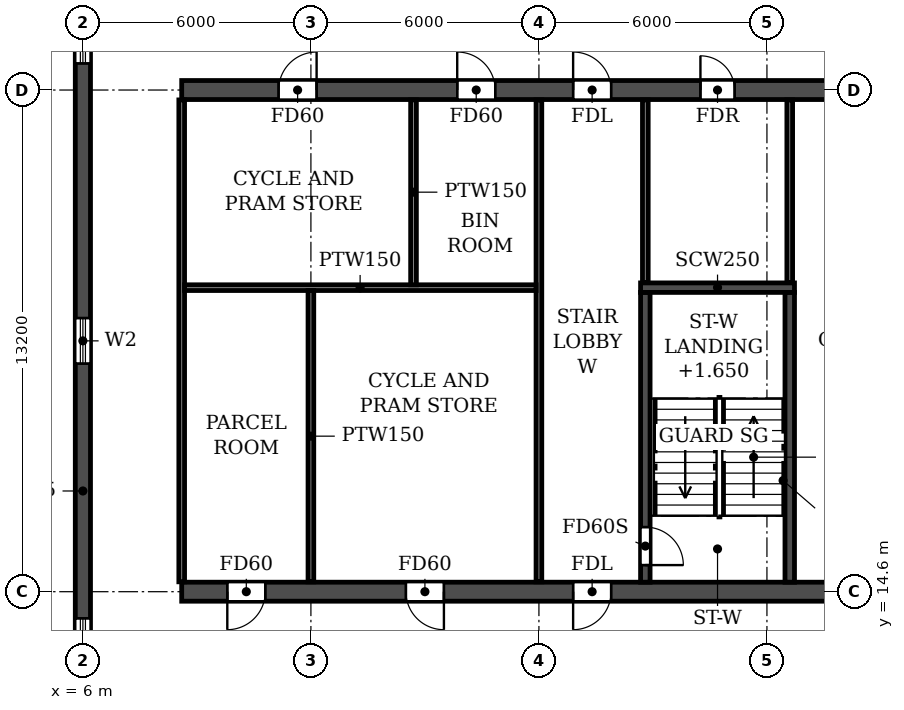
"""IFC4 building model, lengths in metres.
Left out: names, types, materials, properties, quantities, classifications, styles, units other than length and angle.
Written with IfcOpenShell. Run it as: python <this file> out.ifc"""

import sys

from ifc_helpers import new_model, si_unit, direction, frame, frame_2d, origin, place, context, subcontext, project, spatial, rectangle, extrude, element, fill, save


model = new_model("IFC4")
c1 = context("Model", 3, precision=1e-05, world=origin(), true_north=direction((0.0, 1.0)))
c2 = subcontext(c1, "Body", "Model", "MODEL_VIEW")
j1 = project(units=[si_unit("LENGTHUNIT", "METRE"), si_unit("PLANEANGLEUNIT", "RADIAN")], contexts=[c1])
p1 = place(None, origin())
s1 = spatial("IfcSite", under=j1, at=p1, CompositionType="ELEMENT")
p2 = place(p1, origin())
s2 = spatial("IfcBuilding", under=s1, at=p2, CompositionType="ELEMENT")
p3 = place(p2, frame((0.0, 0.0, 82.8)))
s3 = spatial("IfcBuildingStorey", under=s2, at=p3, CompositionType="ELEMENT", Elevation=82.8)
p4 = place(p3, frame((6.0, 4.683, 0.0), z_axis=(0.0, 0.0, 1.0), x_axis=(0.0, 1.0, 0.0)))
e1 = element("IfcWall", 1, at=p4, inside=s3, PredefinedType="SHEAR", context=c2, shape_type="SweptSolid", body=[
    extrude(rectangle(XDim=34.234, YDim=0.4, at=frame_2d((17.117, 0.0))), origin(), (0.0, 0.0, 1.0), 3.06),
])
p5 = place(p4, frame((23.817, 0.0, 0.9)))
e2 = element("IfcOpeningElement", 2, at=p5, cuts=e1, PredefinedType="OPENING", context=c2, shape_type="SweptSolid", body=[
    extrude(rectangle(XDim=1.2, YDim=1.5, at=frame_2d((0.6, 0.75))), frame((0.0, 0.21, 0.0), z_axis=(0.0, -1.0, 0.0), x_axis=(1.0, 0.0, 0.0)), (0.0, 0.0, 1.0), 0.42),
])
p6 = place(p4, frame((8.017, 0.0, 0.9)))
e3 = element("IfcOpeningElement", 3, at=p6, cuts=e1, PredefinedType="OPENING", context=c2, shape_type="SweptSolid", body=[
    extrude(rectangle(XDim=1.2, YDim=1.5, at=frame_2d((0.6, 0.75))), frame((0.0, 0.21, 0.0), z_axis=(0.0, -1.0, 0.0), x_axis=(1.0, 0.0, 0.0)), (0.0, 0.0, 1.0), 0.42),
])
p7 = place(p4, frame((15.917, 0.0, 0.9)))
e4 = element("IfcOpeningElement", 4, at=p7, cuts=e1, PredefinedType="OPENING", context=c2, shape_type="SweptSolid", body=[
    extrude(rectangle(XDim=1.2, YDim=1.5, at=frame_2d((0.6, 0.75))), frame((0.0, 0.21, 0.0), z_axis=(0.0, -1.0, 0.0), x_axis=(1.0, 0.0, 0.0)), (0.0, 0.0, 1.0), 0.42),
])
p8 = place(p4, frame((28.894, 0.0, 0.6)))
e5 = element("IfcOpeningElement", 5, at=p8, cuts=e1, PredefinedType="OPENING", context=c2, shape_type="SweptSolid", body=[
    extrude(rectangle(XDim=2.2, YDim=1.8, at=frame_2d((1.1, 0.9))), frame((0.0, 0.21, 0.0), z_axis=(0.0, -1.0, 0.0), x_axis=(1.0, 0.0, 0.0)), (0.0, 0.0, 1.0), 0.42),
])
p9 = place(p4, frame((2.541, 0.0, 0.6)))
e6 = element("IfcOpeningElement", 6, at=p9, cuts=e1, PredefinedType="OPENING", context=c2, shape_type="SweptSolid", body=[
    extrude(rectangle(XDim=2.2, YDim=1.8, at=frame_2d((1.1, 0.9))), frame((0.0, 0.21, 0.0), z_axis=(0.0, -1.0, 0.0), x_axis=(1.0, 0.0, 0.0)), (0.0, 0.0, 1.0), 0.42),
])
p10 = place(p3, frame((8.6, 14.6, 0.0), z_axis=(0.0, 0.0, 1.0), x_axis=(1.0, 0.0, 0.0)))
e7 = element("IfcWall", 7, at=p10, inside=s3, PredefinedType="SOLIDWALL", context=c2, shape_type="SweptSolid", body=[
    extrude(rectangle(XDim=84.8, YDim=0.5, at=frame_2d((42.4, 0.0))), origin(), (0.0, 0.0, 1.0), 3.06),
])
p11 = place(p10, frame((1.2, 0.0, 0.0)))
e8 = element("IfcOpeningElement", 8, at=p11, cuts=e7, PredefinedType="OPENING", context=c2, shape_type="SweptSolid", body=[
    extrude(rectangle(XDim=1.0, YDim=2.1, at=frame_2d((0.5, 1.05))), frame((0.0, 0.26, 0.0), z_axis=(0.0, -1.0, 0.0), x_axis=(1.0, 0.0, 0.0)), (0.0, 0.0, 1.0), 0.52),
])
p12 = place(p10, frame((5.9, 0.0, 0.0)))
e9 = element("IfcOpeningElement", 9, at=p12, cuts=e7, PredefinedType="OPENING", context=c2, shape_type="SweptSolid", body=[
    extrude(rectangle(XDim=1.0, YDim=2.1, at=frame_2d((0.5, 1.05))), frame((0.0, 0.26, 0.0), z_axis=(0.0, -1.0, 0.0), x_axis=(1.0, 0.0, 0.0)), (0.0, 0.0, 1.0), 0.52),
])
p13 = place(p10, frame((10.3, 0.0, 0.0)))
e10 = element("IfcOpeningElement", 10, at=p13, cuts=e7, PredefinedType="OPENING", context=c2, shape_type="SweptSolid", body=[
    extrude(rectangle(XDim=1.0, YDim=2.1, at=frame_2d((0.5, 1.05))), frame((0.0, 0.26, 0.0), z_axis=(0.0, -1.0, 0.0), x_axis=(1.0, 0.0, 0.0)), (0.0, 0.0, 1.0), 0.52),
])
p14 = place(p10, frame((18.2, 0.0, 0.0)))
e11 = element("IfcOpeningElement", 11, at=p14, cuts=e7, PredefinedType="OPENING", context=c2, shape_type="SweptSolid", body=[
    extrude(rectangle(XDim=1.0, YDim=2.1, at=frame_2d((0.5, 1.05))), frame((0.0, 0.26, 0.0), z_axis=(0.0, -1.0, 0.0), x_axis=(1.0, 0.0, 0.0)), (0.0, 0.0, 1.0), 0.52),
])
p15 = place(p10, frame((22.8, 0.0, 0.0)))
e12 = element("IfcOpeningElement", 12, at=p15, cuts=e7, PredefinedType="OPENING", context=c2, shape_type="SweptSolid", body=[
    extrude(rectangle(XDim=1.0, YDim=2.1, at=frame_2d((0.5, 1.05))), frame((0.0, 0.26, 0.0), z_axis=(0.0, -1.0, 0.0), x_axis=(1.0, 0.0, 0.0)), (0.0, 0.0, 1.0), 0.52),
])
p16 = place(p10, frame((36.7, 0.0, 0.0)))
e13 = element("IfcOpeningElement", 13, at=p16, cuts=e7, PredefinedType="OPENING", context=c2, shape_type="SweptSolid", body=[
    extrude(rectangle(XDim=1.0, YDim=2.1, at=frame_2d((0.5, 1.05))), frame((0.0, 0.26, 0.0), z_axis=(0.0, -1.0, 0.0), x_axis=(1.0, 0.0, 0.0)), (0.0, 0.0, 1.0), 0.52),
])
p17 = place(p10, frame((41.9, 0.0, 0.0)))
e14 = element("IfcOpeningElement", 14, at=p17, cuts=e7, PredefinedType="OPENING", context=c2, shape_type="SweptSolid", body=[
    extrude(rectangle(XDim=1.0, YDim=2.1, at=frame_2d((0.5, 1.05))), frame((0.0, 0.26, 0.0), z_axis=(0.0, -1.0, 0.0), x_axis=(1.0, 0.0, 0.0)), (0.0, 0.0, 1.0), 0.52),
])
p18 = place(p10, frame((44.5, 0.0, 0.0)))
e15 = element("IfcOpeningElement", 15, at=p18, cuts=e7, PredefinedType="OPENING", context=c2, shape_type="SweptSolid", body=[
    extrude(rectangle(XDim=1.0, YDim=2.1, at=frame_2d((0.5, 1.05))), frame((0.0, 0.26, 0.0), z_axis=(0.0, -1.0, 0.0), x_axis=(1.0, 0.0, 0.0)), (0.0, 0.0, 1.0), 0.52),
])
p19 = place(p10, frame((48.4, 0.0, 0.0)))
e16 = element("IfcOpeningElement", 16, at=p19, cuts=e7, PredefinedType="OPENING", context=c2, shape_type="SweptSolid", body=[
    extrude(rectangle(XDim=1.0, YDim=2.1, at=frame_2d((0.5, 1.05))), frame((0.0, 0.26, 0.0), z_axis=(0.0, -1.0, 0.0), x_axis=(1.0, 0.0, 0.0)), (0.0, 0.0, 1.0), 0.52),
])
p20 = place(p10, frame((61.0, 0.0, 0.0)))
e17 = element("IfcOpeningElement", 17, at=p20, cuts=e7, PredefinedType="OPENING", context=c2, shape_type="SweptSolid", body=[
    extrude(rectangle(XDim=1.0, YDim=2.1, at=frame_2d((0.5, 1.05))), frame((0.0, 0.26, 0.0), z_axis=(0.0, -1.0, 0.0), x_axis=(1.0, 0.0, 0.0)), (0.0, 0.0, 1.0), 0.52),
])
p21 = place(p10, frame((65.6, 0.0, 0.0)))
e18 = element("IfcOpeningElement", 18, at=p21, cuts=e7, PredefinedType="OPENING", context=c2, shape_type="SweptSolid", body=[
    extrude(rectangle(XDim=1.0, YDim=2.1, at=frame_2d((0.5, 1.05))), frame((0.0, 0.26, 0.0), z_axis=(0.0, -1.0, 0.0), x_axis=(1.0, 0.0, 0.0)), (0.0, 0.0, 1.0), 0.52),
])
p22 = place(p10, frame((73.5, 0.0, 0.0)))
e19 = element("IfcOpeningElement", 19, at=p22, cuts=e7, PredefinedType="OPENING", context=c2, shape_type="SweptSolid", body=[
    extrude(rectangle(XDim=1.0, YDim=2.1, at=frame_2d((0.5, 1.05))), frame((0.0, 0.26, 0.0), z_axis=(0.0, -1.0, 0.0), x_axis=(1.0, 0.0, 0.0)), (0.0, 0.0, 1.0), 0.52),
])
p23 = place(p10, frame((77.3, 0.0, 0.0)))
e20 = element("IfcOpeningElement", 20, at=p23, cuts=e7, PredefinedType="OPENING", context=c2, shape_type="SweptSolid", body=[
    extrude(rectangle(XDim=1.0, YDim=2.1, at=frame_2d((0.5, 1.05))), frame((0.0, 0.26, 0.0), z_axis=(0.0, -1.0, 0.0), x_axis=(1.0, 0.0, 0.0)), (0.0, 0.0, 1.0), 0.52),
])
p24 = place(p10, frame((82.0, 0.0, 0.0)))
e21 = element("IfcOpeningElement", 21, at=p24, cuts=e7, PredefinedType="OPENING", context=c2, shape_type="SweptSolid", body=[
    extrude(rectangle(XDim=1.0, YDim=2.1, at=frame_2d((0.5, 1.05))), frame((0.0, 0.26, 0.0), z_axis=(0.0, -1.0, 0.0), x_axis=(1.0, 0.0, 0.0)), (0.0, 0.0, 1.0), 0.52),
])
p25 = place(p3, frame((8.6, 27.8, 0.0), z_axis=(0.0, 0.0, 1.0), x_axis=(1.0, 0.0, 0.0)))
e22 = element("IfcWall", 22, at=p25, inside=s3, PredefinedType="SOLIDWALL", context=c2, shape_type="SweptSolid", body=[
    extrude(rectangle(XDim=84.8, YDim=0.5, at=frame_2d((42.4, 0.0))), origin(), (0.0, 0.0, 1.0), 3.06),
])
p26 = place(p25, frame((2.55, 0.0, 0.0)))
e23 = element("IfcOpeningElement", 23, at=p26, cuts=e22, PredefinedType="OPENING", context=c2, shape_type="SweptSolid", body=[
    extrude(rectangle(XDim=1.0, YDim=2.1, at=frame_2d((0.5, 1.05))), frame((0.0, 0.26, 0.0), z_axis=(0.0, -1.0, 0.0), x_axis=(1.0, 0.0, 0.0)), (0.0, 0.0, 1.0), 0.52),
])
p27 = place(p25, frame((7.25, 0.0, 0.0)))
e24 = element("IfcOpeningElement", 24, at=p27, cuts=e22, PredefinedType="OPENING", context=c2, shape_type="SweptSolid", body=[
    extrude(rectangle(XDim=1.0, YDim=2.1, at=frame_2d((0.5, 1.05))), frame((0.0, 0.26, 0.0), z_axis=(0.0, -1.0, 0.0), x_axis=(1.0, 0.0, 0.0)), (0.0, 0.0, 1.0), 0.52),
])
p28 = place(p25, frame((10.3, 0.0, 0.0)))
e25 = element("IfcOpeningElement", 25, at=p28, cuts=e22, PredefinedType="OPENING", context=c2, shape_type="SweptSolid", body=[
    extrude(rectangle(XDim=1.0, YDim=2.1, at=frame_2d((0.5, 1.05))), frame((0.0, 0.26, 0.0), z_axis=(0.0, -1.0, 0.0), x_axis=(1.0, 0.0, 0.0)), (0.0, 0.0, 1.0), 0.52),
])
p29 = place(p25, frame((13.65, 0.0, 0.0)))
e26 = element("IfcOpeningElement", 26, at=p29, cuts=e22, PredefinedType="OPENING", context=c2, shape_type="SweptSolid", body=[
    extrude(rectangle(XDim=0.9, YDim=2.1, at=frame_2d((0.45, 1.05))), frame((0.0, 0.26, 0.0), z_axis=(0.0, -1.0, 0.0), x_axis=(1.0, 0.0, 0.0)), (0.0, 0.0, 1.0), 0.52),
])
p30 = place(p25, frame((22.85, 0.0, 0.0)))
e27 = element("IfcOpeningElement", 27, at=p30, cuts=e22, PredefinedType="OPENING", context=c2, shape_type="SweptSolid", body=[
    extrude(rectangle(XDim=0.9, YDim=2.1, at=frame_2d((0.45, 1.05))), frame((0.0, 0.26, 0.0), z_axis=(0.0, -1.0, 0.0), x_axis=(1.0, 0.0, 0.0)), (0.0, 0.0, 1.0), 0.52),
])
p31 = place(p25, frame((27.3, 0.0, 0.0)))
e28 = element("IfcOpeningElement", 28, at=p31, cuts=e22, PredefinedType="OPENING", context=c2, shape_type="SweptSolid", body=[
    extrude(rectangle(XDim=1.0, YDim=2.1, at=frame_2d((0.5, 1.05))), frame((0.0, 0.26, 0.0), z_axis=(0.0, -1.0, 0.0), x_axis=(1.0, 0.0, 0.0)), (0.0, 0.0, 1.0), 0.52),
])
p32 = place(p25, frame((32.25, 0.0, 0.0)))
e29 = element("IfcOpeningElement", 29, at=p32, cuts=e22, PredefinedType="OPENING", context=c2, shape_type="SweptSolid", body=[
    extrude(rectangle(XDim=1.5, YDim=2.1, at=frame_2d((0.75, 1.05))), frame((0.0, 0.26, 0.0), z_axis=(0.0, -1.0, 0.0), x_axis=(1.0, 0.0, 0.0)), (0.0, 0.0, 1.0), 0.52),
])
p33 = place(p25, frame((39.0, 0.0, 0.0)))
e30 = element("IfcOpeningElement", 30, at=p33, cuts=e22, PredefinedType="OPENING", context=c2, shape_type="SweptSolid", body=[
    extrude(rectangle(XDim=1.0, YDim=2.1, at=frame_2d((0.5, 1.05))), frame((0.0, 0.26, 0.0), z_axis=(0.0, -1.0, 0.0), x_axis=(1.0, 0.0, 0.0)), (0.0, 0.0, 1.0), 0.52),
])
p34 = place(p25, frame((41.9, 0.0, 0.0)))
e31 = element("IfcOpeningElement", 31, at=p34, cuts=e22, PredefinedType="OPENING", context=c2, shape_type="SweptSolid", body=[
    extrude(rectangle(XDim=1.0, YDim=2.1, at=frame_2d((0.5, 1.05))), frame((0.0, 0.26, 0.0), z_axis=(0.0, -1.0, 0.0), x_axis=(1.0, 0.0, 0.0)), (0.0, 0.0, 1.0), 0.52),
])
p35 = place(p25, frame((47.4, 0.0, 0.0)))
e32 = element("IfcOpeningElement", 32, at=p35, cuts=e22, PredefinedType="OPENING", context=c2, shape_type="SweptSolid", body=[
    extrude(rectangle(XDim=1.0, YDim=2.1, at=frame_2d((0.5, 1.05))), frame((0.0, 0.26, 0.0), z_axis=(0.0, -1.0, 0.0), x_axis=(1.0, 0.0, 0.0)), (0.0, 0.0, 1.0), 0.52),
])
p36 = place(p25, frame((52.6, 0.0, 0.0)))
e33 = element("IfcOpeningElement", 33, at=p36, cuts=e22, PredefinedType="OPENING", context=c2, shape_type="SweptSolid", body=[
    extrude(rectangle(XDim=1.0, YDim=2.1, at=frame_2d((0.5, 1.05))), frame((0.0, 0.26, 0.0), z_axis=(0.0, -1.0, 0.0), x_axis=(1.0, 0.0, 0.0)), (0.0, 0.0, 1.0), 0.52),
])
p37 = place(p25, frame((56.5, 0.0, 0.0)))
e34 = element("IfcOpeningElement", 34, at=p37, cuts=e22, PredefinedType="OPENING", context=c2, shape_type="SweptSolid", body=[
    extrude(rectangle(XDim=1.0, YDim=2.1, at=frame_2d((0.5, 1.05))), frame((0.0, 0.26, 0.0), z_axis=(0.0, -1.0, 0.0), x_axis=(1.0, 0.0, 0.0)), (0.0, 0.0, 1.0), 0.52),
])
p38 = place(p25, frame((61.05, 0.0, 0.0)))
e35 = element("IfcOpeningElement", 35, at=p38, cuts=e22, PredefinedType="OPENING", context=c2, shape_type="SweptSolid", body=[
    extrude(rectangle(XDim=0.9, YDim=2.1, at=frame_2d((0.45, 1.05))), frame((0.0, 0.26, 0.0), z_axis=(0.0, -1.0, 0.0), x_axis=(1.0, 0.0, 0.0)), (0.0, 0.0, 1.0), 0.52),
])
p39 = place(p25, frame((70.25, 0.0, 0.0)))
e36 = element("IfcOpeningElement", 36, at=p39, cuts=e22, PredefinedType="OPENING", context=c2, shape_type="SweptSolid", body=[
    extrude(rectangle(XDim=0.9, YDim=2.1, at=frame_2d((0.45, 1.05))), frame((0.0, 0.26, 0.0), z_axis=(0.0, -1.0, 0.0), x_axis=(1.0, 0.0, 0.0)), (0.0, 0.0, 1.0), 0.52),
])
p40 = place(p25, frame((73.5, 0.0, 0.0)))
e37 = element("IfcOpeningElement", 37, at=p40, cuts=e22, PredefinedType="OPENING", context=c2, shape_type="SweptSolid", body=[
    extrude(rectangle(XDim=1.0, YDim=2.1, at=frame_2d((0.5, 1.05))), frame((0.0, 0.26, 0.0), z_axis=(0.0, -1.0, 0.0), x_axis=(1.0, 0.0, 0.0)), (0.0, 0.0, 1.0), 0.52),
])
p41 = place(p25, frame((76.55, 0.0, 0.0)))
e38 = element("IfcOpeningElement", 38, at=p41, cuts=e22, PredefinedType="OPENING", context=c2, shape_type="SweptSolid", body=[
    extrude(rectangle(XDim=1.0, YDim=2.1, at=frame_2d((0.5, 1.05))), frame((0.0, 0.26, 0.0), z_axis=(0.0, -1.0, 0.0), x_axis=(1.0, 0.0, 0.0)), (0.0, 0.0, 1.0), 0.52),
])
p42 = place(p25, frame((81.25, 0.0, 0.0)))
e39 = element("IfcOpeningElement", 39, at=p42, cuts=e22, PredefinedType="OPENING", context=c2, shape_type="SweptSolid", body=[
    extrude(rectangle(XDim=1.0, YDim=2.1, at=frame_2d((0.5, 1.05))), frame((0.0, 0.26, 0.0), z_axis=(0.0, -1.0, 0.0), x_axis=(1.0, 0.0, 0.0)), (0.0, 0.0, 1.0), 0.52),
])
p43 = place(p3, frame((20.8, 14.85, 0.0), z_axis=(0.0, 0.0, 1.0), x_axis=(0.0, 1.0, 0.0)))
e40 = element("IfcWall", 40, at=p43, inside=s3, PredefinedType="SOLIDWALL", context=c2, shape_type="SweptSolid", body=[
    extrude(rectangle(XDim=7.625, YDim=0.25, at=frame_2d((3.812, 0.0))), origin(), (0.0, 0.0, 1.0), 3.06),
])
p44 = place(p43, frame((0.45, 0.0, 0.0)))
e41 = element("IfcOpeningElement", 41, at=p44, cuts=e40, PredefinedType="OPENING", context=c2, shape_type="SweptSolid", body=[
    extrude(rectangle(XDim=1.0, YDim=2.1, at=frame_2d((0.5, 1.05))), frame((0.0, 0.135, 0.0), z_axis=(0.0, -1.0, 0.0), x_axis=(1.0, 0.0, 0.0)), (0.0, 0.0, 1.0), 0.27),
])
p45 = place(p3, frame((24.6, 14.85, 0.0), z_axis=(0.0, 0.0, 1.0), x_axis=(0.0, 1.0, 0.0)))
e42 = element("IfcWall", 42, at=p45, inside=s3, PredefinedType="SOLIDWALL", context=c2, shape_type="SweptSolid", body=[
    extrude(rectangle(XDim=7.625, YDim=0.25, at=frame_2d((3.812, 0.0))), origin(), (0.0, 0.0, 1.0), 3.06),
])
p46 = place(p3, frame((20.675, 22.6, 0.0), z_axis=(0.0, 0.0, 1.0), x_axis=(1.0, 0.0, 0.0)))
e43 = element("IfcWall", 43, at=p46, inside=s3, PredefinedType="SOLIDWALL", context=c2, shape_type="SweptSolid", body=[
    extrude(rectangle(XDim=4.05, YDim=0.25, at=frame_2d((2.025, 0.0))), origin(), (0.0, 0.0, 1.0), 3.06),
])
for number, where, z_axis, x_axis in (
    (44, (8.6, 14.86, 0.0), (0.0, 0.0, 1.0), (0.0, 1.0, 0.0)),
    (45, (18.0, 14.86, 0.0), (0.0, 0.0, 1.0), (0.0, 1.0, 0.0)),
):
    element("IfcWall", number, at=place(p3, frame(where, z_axis=z_axis, x_axis=x_axis)), inside=s3, PredefinedType="PARTITIONING", context=c2, shape_type="SweptSolid", body=[
        extrude(rectangle(XDim=12.68, YDim=0.15, at=frame_2d((6.34, 0.0))), origin(), (0.0, 0.0, 1.0), 3.06),
    ])
p47 = place(p3, frame((8.675, 22.6, 0.0), z_axis=(0.0, 0.0, 1.0), x_axis=(1.0, 0.0, 0.0)))
e46 = element("IfcWall", 46, at=p47, inside=s3, PredefinedType="PARTITIONING", context=c2, shape_type="SweptSolid", body=[
    extrude(rectangle(XDim=9.25, YDim=0.15, at=frame_2d((4.625, 0.0))), origin(), (0.0, 0.0, 1.0), 3.06),
])
p48 = place(p3, frame((12.0, 14.86, 0.0), z_axis=(0.0, 0.0, 1.0), x_axis=(0.0, 1.0, 0.0)))
e47 = element("IfcWall", 47, at=p48, inside=s3, PredefinedType="PARTITIONING", context=c2, shape_type="SweptSolid", body=[
    extrude(rectangle(XDim=7.665, YDim=0.15, at=frame_2d((3.833, 0.0))), origin(), (0.0, 0.0, 1.0), 3.06),
])
p49 = place(p3, frame((14.7, 22.675, 0.0), z_axis=(0.0, 0.0, 1.0), x_axis=(0.0, 1.0, 0.0)))
e48 = element("IfcWall", 48, at=p49, inside=s3, PredefinedType="PARTITIONING", context=c2, shape_type="SweptSolid", body=[
    extrude(rectangle(XDim=4.865, YDim=0.15, at=frame_2d((2.433, 0.0))), origin(), (0.0, 0.0, 1.0), 3.06),
])
for number, where, z_axis, x_axis in (
    (49, (20.8, 22.735, 0.0), (0.0, 0.0, 1.0), (0.0, 1.0, 0.0)),
    (50, (24.6, 22.735, 0.0), (0.0, 0.0, 1.0), (0.0, 1.0, 0.0)),
):
    element("IfcWall", number, at=place(p3, frame(where, z_axis=z_axis, x_axis=x_axis)), inside=s3, PredefinedType="PARTITIONING", context=c2, shape_type="SweptSolid", body=[
        extrude(rectangle(XDim=4.805, YDim=0.15, at=frame_2d((2.402, 0.0))), origin(), (0.0, 0.0, 1.0), 3.06),
    ])
p50 = place(p5, origin())
e51 = element("IfcWindow", 51, at=p50, inside=s3, PartitioningType="SINGLE_PANEL", PredefinedType="WINDOW", context=c2, shape_type="SweptSolid", body=[
    extrude(rectangle(XDim=1.2, YDim=1.5, at=frame_2d((0.6, 0.75))), frame((0.0, 0.03, 0.0), z_axis=(0.0, -1.0, 0.0), x_axis=(1.0, 0.0, 0.0)), (0.0, 0.0, 1.0), 0.06),
])
fill(e2, e51)
p51 = place(p6, origin())
e52 = element("IfcWindow", 52, at=p51, inside=s3, PartitioningType="SINGLE_PANEL", PredefinedType="WINDOW", context=c2, shape_type="SweptSolid", body=[
    extrude(rectangle(XDim=1.2, YDim=1.5, at=frame_2d((0.6, 0.75))), frame((0.0, 0.03, 0.0), z_axis=(0.0, -1.0, 0.0), x_axis=(1.0, 0.0, 0.0)), (0.0, 0.0, 1.0), 0.06),
])
fill(e3, e52)
p52 = place(p7, origin())
e53 = element("IfcWindow", 53, at=p52, inside=s3, PartitioningType="SINGLE_PANEL", PredefinedType="WINDOW", context=c2, shape_type="SweptSolid", body=[
    extrude(rectangle(XDim=1.2, YDim=1.5, at=frame_2d((0.6, 0.75))), frame((0.0, 0.03, 0.0), z_axis=(0.0, -1.0, 0.0), x_axis=(1.0, 0.0, 0.0)), (0.0, 0.0, 1.0), 0.06),
])
fill(e4, e53)
p53 = place(p26, origin())
e54 = element("IfcDoor", 54, at=p53, inside=s3, OperationType="SINGLE_SWING_RIGHT", PredefinedType="DOOR", context=c2, shape_type="SweptSolid", body=[
    extrude(rectangle(XDim=1.0, YDim=2.1, at=frame_2d((0.5, 1.05))), frame((0.0, 0.025, 0.0), z_axis=(0.0, -1.0, 0.0), x_axis=(1.0, 0.0, 0.0)), (0.0, 0.0, 1.0), 0.05),
])
fill(e23, e54)
p54 = place(p27, origin())
e55 = element("IfcDoor", 55, at=p54, inside=s3, OperationType="SINGLE_SWING_LEFT", PredefinedType="DOOR", context=c2, shape_type="SweptSolid", body=[
    extrude(rectangle(XDim=1.0, YDim=2.1, at=frame_2d((0.5, 1.05))), frame((0.0, 0.025, 0.0), z_axis=(0.0, -1.0, 0.0), x_axis=(1.0, 0.0, 0.0)), (0.0, 0.0, 1.0), 0.05),
])
fill(e24, e55)
p55 = place(p28, origin())
e56 = element("IfcDoor", 56, at=p55, inside=s3, OperationType="SINGLE_SWING_LEFT", PredefinedType="DOOR", context=c2, shape_type="SweptSolid", body=[
    extrude(rectangle(XDim=1.0, YDim=2.1, at=frame_2d((0.5, 1.05))), frame((0.0, 0.025, 0.0), z_axis=(0.0, -1.0, 0.0), x_axis=(1.0, 0.0, 0.0)), (0.0, 0.0, 1.0), 0.05),
])
fill(e25, e56)
p56 = place(p29, origin())
e57 = element("IfcDoor", 57, at=p56, inside=s3, OperationType="SINGLE_SWING_LEFT", PredefinedType="DOOR", context=c2, shape_type="SweptSolid", body=[
    extrude(rectangle(XDim=0.9, YDim=2.1, at=frame_2d((0.45, 1.05))), frame((0.0, 0.025, 0.0), z_axis=(0.0, -1.0, 0.0), x_axis=(1.0, 0.0, 0.0)), (0.0, 0.0, 1.0), 0.05),
])
fill(e26, e57)
p57 = place(p11, frame((1.0, 0.0, 0.0), z_axis=(0.0, 0.0, 1.0), x_axis=(-1.0, 0.0, 0.0)))
e58 = element("IfcDoor", 58, at=p57, inside=s3, OperationType="SINGLE_SWING_RIGHT", PredefinedType="DOOR", context=c2, shape_type="SweptSolid", body=[
    extrude(rectangle(XDim=1.0, YDim=2.1, at=frame_2d((0.5, 1.05))), frame((0.0, 0.025, 0.0), z_axis=(0.0, -1.0, 0.0), x_axis=(1.0, 0.0, 0.0)), (0.0, 0.0, 1.0), 0.05),
])
fill(e8, e58)
p58 = place(p12, frame((1.0, 0.0, 0.0), z_axis=(0.0, 0.0, 1.0), x_axis=(-1.0, 0.0, 0.0)))
e59 = element("IfcDoor", 59, at=p58, inside=s3, OperationType="SINGLE_SWING_LEFT", PredefinedType="DOOR", context=c2, shape_type="SweptSolid", body=[
    extrude(rectangle(XDim=1.0, YDim=2.1, at=frame_2d((0.5, 1.05))), frame((0.0, 0.025, 0.0), z_axis=(0.0, -1.0, 0.0), x_axis=(1.0, 0.0, 0.0)), (0.0, 0.0, 1.0), 0.05),
])
fill(e9, e59)
p59 = place(p13, frame((1.0, 0.0, 0.0), z_axis=(0.0, 0.0, 1.0), x_axis=(-1.0, 0.0, 0.0)))
e60 = element("IfcDoor", 60, at=p59, inside=s3, OperationType="SINGLE_SWING_RIGHT", PredefinedType="DOOR", context=c2, shape_type="SweptSolid", body=[
    extrude(rectangle(XDim=1.0, YDim=2.1, at=frame_2d((0.5, 1.05))), frame((0.0, 0.025, 0.0), z_axis=(0.0, -1.0, 0.0), x_axis=(1.0, 0.0, 0.0)), (0.0, 0.0, 1.0), 0.05),
])
fill(e10, e60)
p60 = place(p44, frame((1.0, 0.0, 0.0), z_axis=(0.0, 0.0, 1.0), x_axis=(-1.0, 0.0, 0.0)))
e61 = element("IfcDoor", 61, at=p60, inside=s3, OperationType="SINGLE_SWING_RIGHT", PredefinedType="DOOR", context=c2, shape_type="SweptSolid", body=[
    extrude(rectangle(XDim=1.0, YDim=2.1, at=frame_2d((0.5, 1.05))), frame((0.0, 0.025, 0.0), z_axis=(0.0, -1.0, 0.0), x_axis=(1.0, 0.0, 0.0)), (0.0, 0.0, 1.0), 0.05),
])
fill(e41, e61)
save(model, sys.argv[1])
